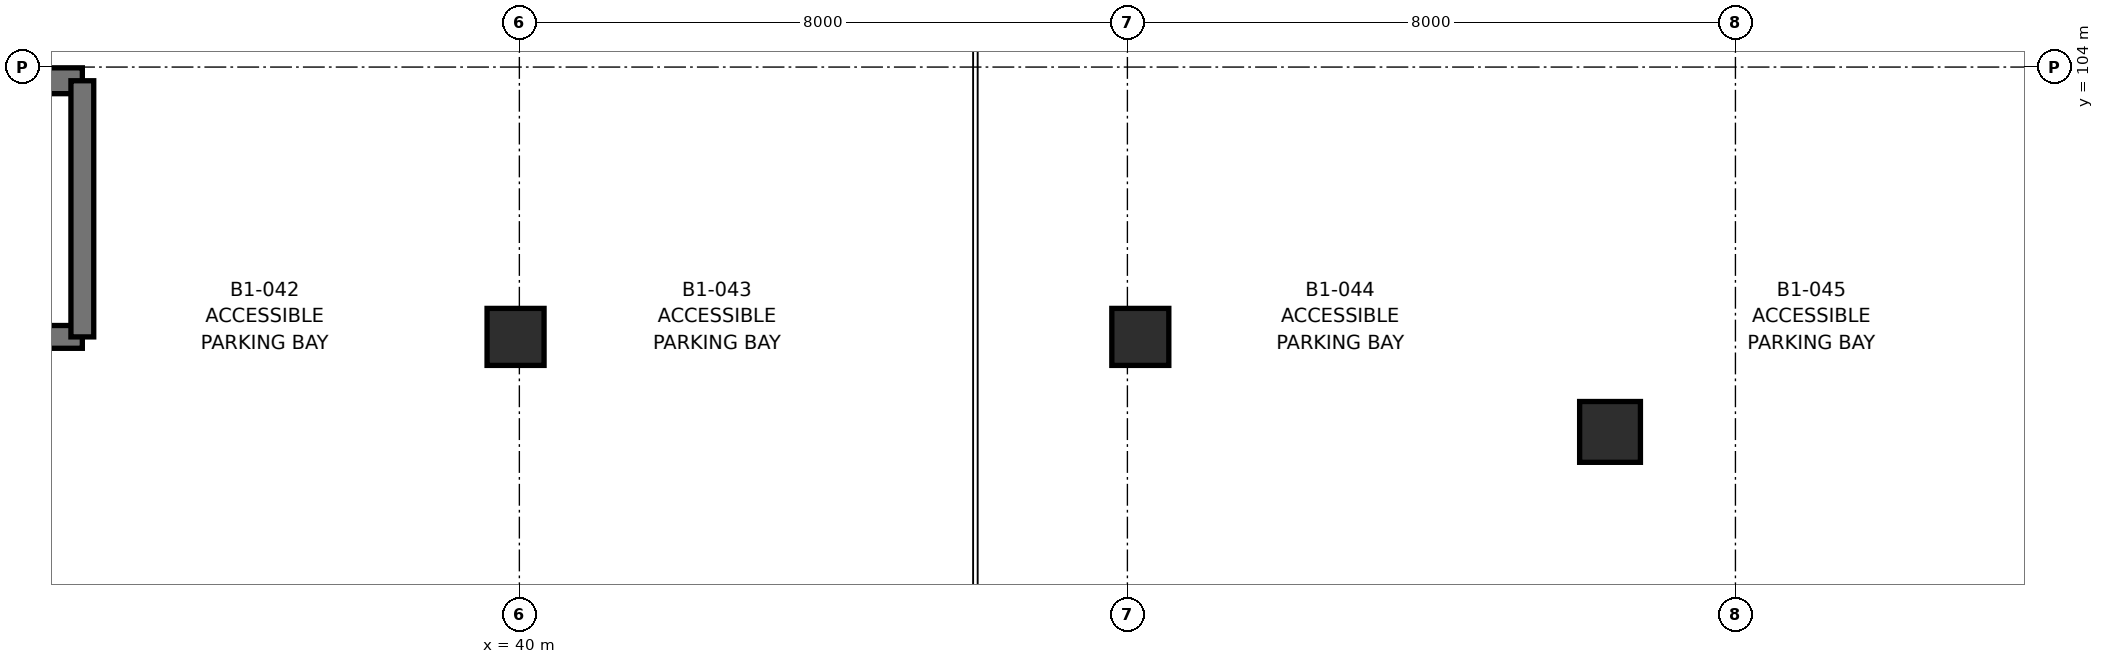
"""IFC4 building model, lengths in metres.
Left out: names, types, materials, properties, quantities, classifications, styles, units other than length and angle.
Written with IfcOpenShell. Run it as: python <this file> out.ifc"""

import sys

from ifc_helpers import new_model, si_unit, direction, frame, frame_2d, origin, origin_2d, place, context, subcontext, project, spatial, rectangle, extrude, element, save


model = new_model("IFC4")
c1 = context("Model", 3, precision=1e-05, world=origin(), true_north=direction((0.0, 1.0)))
c2 = subcontext(c1, "Body", "Model", "MODEL_VIEW")
j1 = project(units=[si_unit("LENGTHUNIT", "METRE"), si_unit("PLANEANGLEUNIT", "RADIAN")], contexts=[c1])
p1 = place(None, origin())
s1 = spatial("IfcSite", under=j1, at=p1, CompositionType="ELEMENT")
p2 = place(p1, origin())
s2 = spatial("IfcBuilding", under=s1, at=p2, CompositionType="ELEMENT")
p3 = place(p2, frame((0.0, 0.0, -3.84)))
s3 = spatial("IfcBuildingStorey", under=s2, at=p3, CompositionType="ELEMENT", Elevation=-3.84)
for number, where, z_axis, x_axis in (
    (1, (39.95, 100.45, 0.0), (0.0, 0.0, 1.0), (1.0, 0.0, 0.0)),
    (2, (48.17, 100.45, 0.0), (0.0, 0.0, 1.0), (1.0, 0.0, 0.0)),
):
    element("IfcColumn", number, at=place(p3, frame(where, z_axis=z_axis, x_axis=x_axis)), inside=s3, PredefinedType="COLUMN", context=c2, shape_type="SweptSolid", body=[
        extrude(rectangle(XDim=0.75, YDim=0.75, at=origin_2d()), origin(), (0.0, 0.0, 1.0), 3.84),
    ])
p4 = place(p3, frame((54.35, 99.2, 0.0), z_axis=(0.0, 0.0, 1.0), x_axis=(1.0, 0.0, 0.0)))
e3 = element("IfcColumn", 3, at=p4, inside=s3, PredefinedType="COLUMN", context=c2, shape_type="SweptSolid", body=[
    extrude(rectangle(XDim=0.8, YDim=0.8, at=origin_2d()), origin(), (0.0, 0.0, 1.0), 3.84),
])
p5 = place(p3, frame((27.35, 100.45, 0.0), z_axis=(0.0, 0.0, 1.0), x_axis=(1.0, 0.0, 0.0)))
e4 = element("IfcWall", 4, at=p5, inside=s3, PredefinedType="SHEAR", context=c2, shape_type="SweptSolid", body=[
    extrude(rectangle(XDim=6.9, YDim=0.3, at=frame_2d((3.45, 0.0))), origin(), (0.0, 0.0, 1.0), 3.84),
])
p6 = place(p3, frame((34.25, 103.82, 0.0), z_axis=(0.0, 0.0, 1.0), x_axis=(-1.0, 0.0, 0.0)))
e5 = element("IfcWall", 5, at=p6, inside=s3, PredefinedType="SHEAR", context=c2, shape_type="SweptSolid", body=[
    extrude(rectangle(XDim=6.9, YDim=0.34, at=frame_2d((3.45, 0.0))), origin(), (0.0, 0.0, 1.0), 3.84),
])
p7 = place(p3, frame((34.25, 100.45, 0.0), z_axis=(0.0, 0.0, 1.0), x_axis=(0.0, 1.0, 0.0)))
e6 = element("IfcWall", 6, at=p7, inside=s3, PredefinedType="SHEAR", context=c2, shape_type="SweptSolid", body=[
    extrude(rectangle(XDim=3.37, YDim=0.3, at=frame_2d((1.685, 0.0))), origin(), (0.0, 0.0, 1.0), 3.84),
])
save(model, sys.argv[1])
